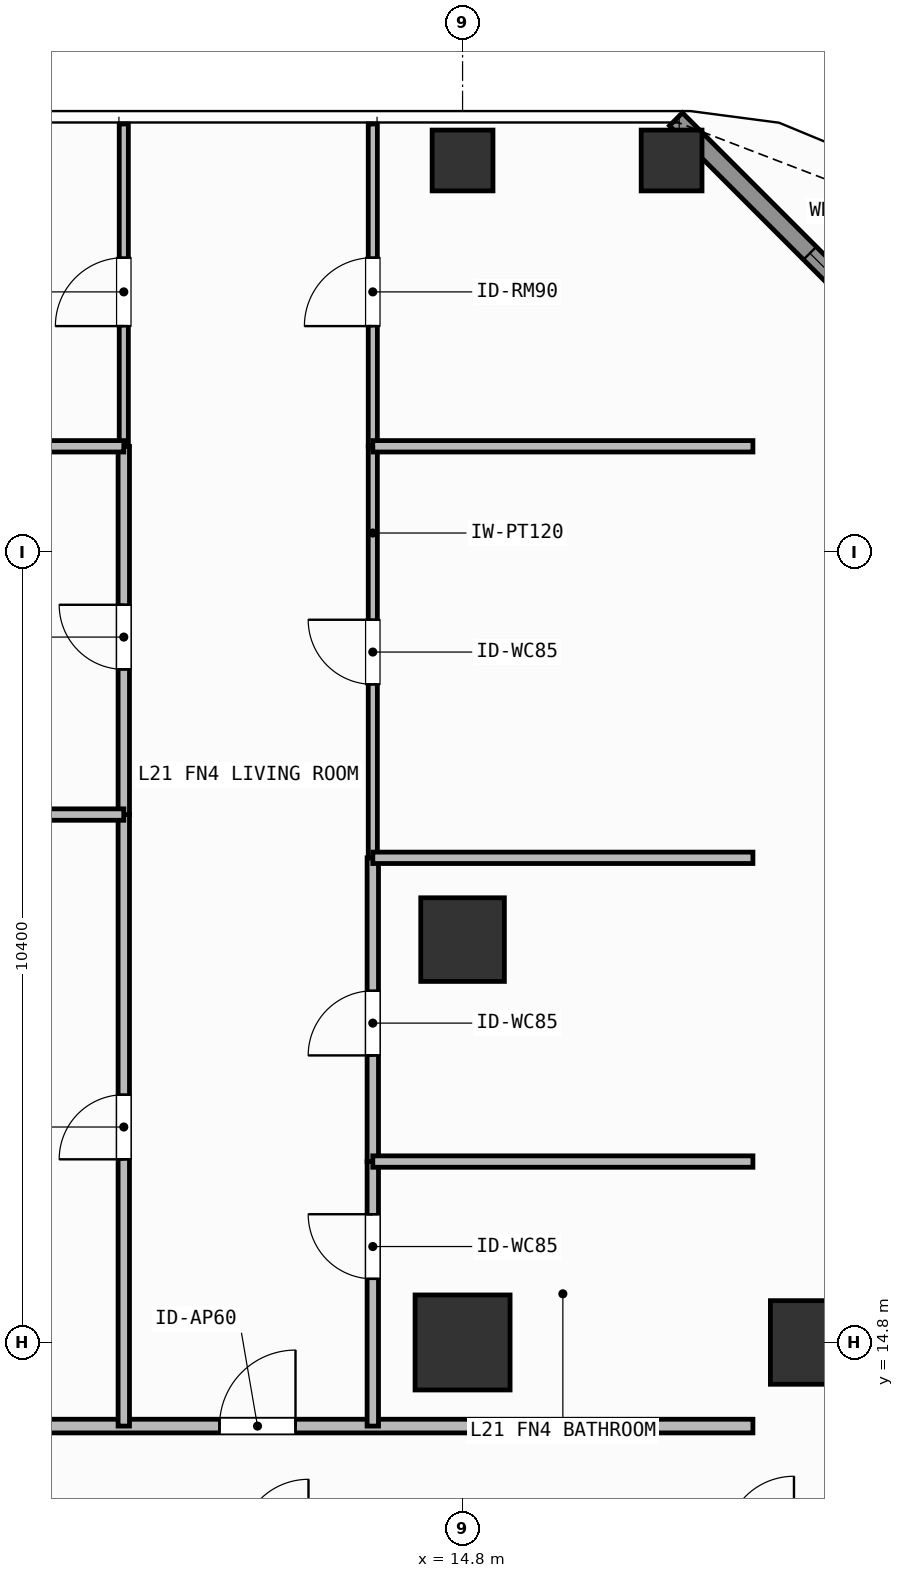
"""IFC4 building model, lengths in metres.
Left out: names, types, materials, properties, quantities, classifications, styles, units other than length and angle.
Written with IfcOpenShell. Run it as: python <this file> out.ifc"""

import sys

from ifc_helpers import new_model, si_unit, direction, frame, frame_2d, origin, origin_2d, place, context, subcontext, project, spatial, rectangle, hollow_rectangle, extrude, element, fill, save


model = new_model("IFC4")
c1 = context("Model", 3, precision=1e-05, world=origin(), true_north=direction((0.0, 1.0)))
c2 = subcontext(c1, "Body", "Model", "MODEL_VIEW")
j1 = project(units=[si_unit("LENGTHUNIT", "METRE"), si_unit("PLANEANGLEUNIT", "RADIAN")], contexts=[c1])
p1 = place(None, origin())
s1 = spatial("IfcSite", under=j1, at=p1, CompositionType="ELEMENT")
p2 = place(p1, origin())
s2 = spatial("IfcBuilding", under=s1, at=p2, CompositionType="ELEMENT")
p3 = place(p2, frame((0.0, 0.0, 85.2)))
s3 = spatial("IfcBuildingStorey", under=s2, at=p3, CompositionType="ELEMENT", Elevation=85.2)
p4 = place(p3, frame((14.8, 14.8, 0.0), z_axis=(0.0, 0.0, 1.0), x_axis=(1.0, 0.0, 0.0)))
e1 = element("IfcColumn", 1, at=p4, inside=s3, PredefinedType="COLUMN", context=c2, shape_type="SweptSolid", body=[
    extrude(rectangle(XDim=1.25, YDim=1.25, at=origin_2d()), origin(), (0.0, 0.0, 1.0), 3.9),
])
for number, where, z_axis, x_axis in (
    (2, (19.4, 14.8, 0.0), (0.0, 0.0, 1.0), (1.0, 0.0, 0.0)),
    (3, (14.8, 20.1, 0.0), (0.0, 0.0, 1.0), (1.0, 0.0, 0.0)),
):
    element("IfcColumn", number, at=place(p3, frame(where, z_axis=z_axis, x_axis=x_axis)), inside=s3, PredefinedType="COLUMN", context=c2, shape_type="SweptSolid", body=[
        extrude(rectangle(XDim=1.1, YDim=1.1, at=origin_2d()), origin(), (0.0, 0.0, 1.0), 3.9),
    ])
for number, where, z_axis, x_axis in (
    (4, (17.55, 30.35, 0.0), (0.0, 0.0, 1.0), (1.0, 0.0, 0.0)),
    (5, (14.8, 30.35, 0.0), (0.0, 0.0, 1.0), (1.0, 0.0, 0.0)),
):
    element("IfcColumn", number, at=place(p3, frame(where, z_axis=z_axis, x_axis=x_axis)), inside=s3, PredefinedType="COLUMN", context=c2, shape_type="SweptSolid", body=[
        extrude(hollow_rectangle(XDim=0.8, YDim=0.8, WallThickness=0.036, at=origin_2d()), origin(), (0.0, 0.0, 1.0), 3.9),
    ])
p5 = place(p3, frame((17.608, 30.892, 0.0), z_axis=(0.0, 0.0, 1.0), x_axis=(0.707106781187, -0.707106781187, 0.0)))
e6 = element("IfcWall", 6, at=p5, inside=s3, PredefinedType="SOLIDWALL", context=c2, shape_type="SweptSolid", body=[
    extrude(rectangle(XDim=6.484, YDim=0.24, at=frame_2d((3.242, 0.0))), origin(), (0.0, 0.0, 1.0), 3.68),
])
p6 = place(p5, frame((2.492, 0.0, 0.8)))
e7 = element("IfcOpeningElement", 7, at=p6, cuts=e6, PredefinedType="OPENING", context=c2, shape_type="SweptSolid", body=[
    extrude(rectangle(XDim=1.5, YDim=1.85, at=frame_2d((0.75, 0.925))), frame((0.0, 0.13, 0.0), z_axis=(0.0, -1.0, 0.0), x_axis=(1.0, 0.0, 0.0)), (0.0, 0.0, 1.0), 0.26),
])
p7 = place(p3, frame((6.117, 13.7, 0.0), z_axis=(0.0, 0.0, 1.0), x_axis=(1.0, 0.0, 0.0)))
e8 = element("IfcWall", 8, at=p7, inside=s3, PredefinedType="PARTITIONING", context=c2, shape_type="SweptSolid", body=[
    extrude(rectangle(XDim=12.503, YDim=0.18, at=frame_2d((6.251, 0.0))), origin(), (0.0, 0.0, 1.0), 3.68),
])
p8 = place(p7, frame((5.485, 0.0, 0.0)))
e9 = element("IfcOpeningElement", 9, at=p8, cuts=e8, PredefinedType="OPENING", context=c2, shape_type="SweptSolid", body=[
    extrude(rectangle(XDim=1.0, YDim=2.2, at=frame_2d((0.5, 1.1))), frame((0.0, 0.1, 0.0), z_axis=(0.0, -1.0, 0.0), x_axis=(1.0, 0.0, 0.0)), (0.0, 0.0, 1.0), 0.2),
])
p9 = place(p3, frame((10.343, 13.7, 0.0), z_axis=(0.0, 0.0, 1.0), x_axis=(0.0, 1.0, 0.0)))
e10 = element("IfcWall", 10, at=p9, inside=s3, PredefinedType="PARTITIONING", context=c2, shape_type="SweptSolid", body=[
    extrude(rectangle(XDim=8.045, YDim=0.15, at=frame_2d((4.022, 0.0))), origin(), (0.0, 0.0, 1.0), 3.68),
])
p10 = place(p9, frame((3.51, 0.0, 0.0)))
e11 = element("IfcOpeningElement", 11, at=p10, cuts=e10, PredefinedType="OPENING", context=c2, shape_type="SweptSolid", body=[
    extrude(rectangle(XDim=0.85, YDim=2.1, at=frame_2d((0.425, 1.05))), frame((0.0, 0.085, 0.0), z_axis=(0.0, -1.0, 0.0), x_axis=(1.0, 0.0, 0.0)), (0.0, 0.0, 1.0), 0.17),
])
p11 = place(p3, frame((10.343, 21.745, 0.0), z_axis=(0.0, 0.0, 1.0), x_axis=(0.0, 1.0, 0.0)))
e12 = element("IfcWall", 12, at=p11, inside=s3, PredefinedType="PARTITIONING", context=c2, shape_type="SweptSolid", body=[
    extrude(rectangle(XDim=4.845, YDim=0.15, at=frame_2d((2.422, 0.0))), origin(), (0.0, 0.0, 1.0), 3.68),
])
p12 = place(p11, frame((1.91, 0.0, 0.0)))
e13 = element("IfcOpeningElement", 13, at=p12, cuts=e12, PredefinedType="OPENING", context=c2, shape_type="SweptSolid", body=[
    extrude(rectangle(XDim=0.85, YDim=2.1, at=frame_2d((0.425, 1.05))), frame((0.0, 0.085, 0.0), z_axis=(0.0, -1.0, 0.0), x_axis=(1.0, 0.0, 0.0)), (0.0, 0.0, 1.0), 0.17),
])
p13 = place(p3, frame((10.343, 26.59, 0.0), z_axis=(0.0, 0.0, 1.0), x_axis=(0.0, 1.0, 0.0)))
e14 = element("IfcWall", 14, at=p13, inside=s3, PredefinedType="PARTITIONING", context=c2, shape_type="SweptSolid", body=[
    extrude(rectangle(XDim=4.24, YDim=0.12, at=frame_2d((2.12, 0.0))), origin(), (0.0, 0.0, 1.0), 3.68),
])
p14 = place(p13, frame((1.581, 0.0, 0.0)))
e15 = element("IfcOpeningElement", 15, at=p14, cuts=e14, PredefinedType="OPENING", context=c2, shape_type="SweptSolid", body=[
    extrude(rectangle(XDim=0.9, YDim=2.1, at=frame_2d((0.45, 1.05))), frame((0.0, 0.07, 0.0), z_axis=(0.0, -1.0, 0.0), x_axis=(1.0, 0.0, 0.0)), (0.0, 0.0, 1.0), 0.14),
])
p15 = place(p3, frame((13.619, 13.7, 0.0), z_axis=(0.0, 0.0, 1.0), x_axis=(0.0, 1.0, 0.0)))
e16 = element("IfcWall", 16, at=p15, inside=s3, PredefinedType="PARTITIONING", context=c2, shape_type="SweptSolid", body=[
    extrude(rectangle(XDim=3.48, YDim=0.15, at=frame_2d((1.74, 0.0))), origin(), (0.0, 0.0, 1.0), 3.68),
])
p16 = place(p15, frame((1.937, 0.0, 0.0)))
e17 = element("IfcOpeningElement", 17, at=p16, cuts=e16, PredefinedType="OPENING", context=c2, shape_type="SweptSolid", body=[
    extrude(rectangle(XDim=0.85, YDim=2.1, at=frame_2d((0.425, 1.05))), frame((0.0, 0.085, 0.0), z_axis=(0.0, -1.0, 0.0), x_axis=(1.0, 0.0, 0.0)), (0.0, 0.0, 1.0), 0.17),
])
p17 = place(p3, frame((13.619, 17.18, 0.0), z_axis=(0.0, 0.0, 1.0), x_axis=(0.0, 1.0, 0.0)))
e18 = element("IfcWall", 18, at=p17, inside=s3, PredefinedType="PARTITIONING", context=c2, shape_type="SweptSolid", body=[
    extrude(rectangle(XDim=3.996, YDim=0.15, at=frame_2d((1.998, 0.0))), origin(), (0.0, 0.0, 1.0), 3.68),
])
p18 = place(p17, frame((1.396, 0.0, 0.0)))
e19 = element("IfcOpeningElement", 19, at=p18, cuts=e18, PredefinedType="OPENING", context=c2, shape_type="SweptSolid", body=[
    extrude(rectangle(XDim=0.85, YDim=2.1, at=frame_2d((0.425, 1.05))), frame((0.0, 0.085, 0.0), z_axis=(0.0, -1.0, 0.0), x_axis=(1.0, 0.0, 0.0)), (0.0, 0.0, 1.0), 0.17),
])
p19 = place(p3, frame((13.619, 21.176, 0.0), z_axis=(0.0, 0.0, 1.0), x_axis=(0.0, 1.0, 0.0)))
e20 = element("IfcWall", 20, at=p19, inside=s3, PredefinedType="PARTITIONING", context=c2, shape_type="SweptSolid", body=[
    extrude(rectangle(XDim=5.414, YDim=0.12, at=frame_2d((2.707, 0.0))), origin(), (0.0, 0.0, 1.0), 3.68),
])
p20 = place(p19, frame((2.282, 0.0, 0.0)))
e21 = element("IfcOpeningElement", 21, at=p20, cuts=e20, PredefinedType="OPENING", context=c2, shape_type="SweptSolid", body=[
    extrude(rectangle(XDim=0.85, YDim=2.1, at=frame_2d((0.425, 1.05))), frame((0.0, 0.07, 0.0), z_axis=(0.0, -1.0, 0.0), x_axis=(1.0, 0.0, 0.0)), (0.0, 0.0, 1.0), 0.14),
])
p21 = place(p3, frame((13.619, 26.59, 0.0), z_axis=(0.0, 0.0, 1.0), x_axis=(0.0, 1.0, 0.0)))
e22 = element("IfcWall", 22, at=p21, inside=s3, PredefinedType="PARTITIONING", context=c2, shape_type="SweptSolid", body=[
    extrude(rectangle(XDim=4.24, YDim=0.12, at=frame_2d((2.12, 0.0))), origin(), (0.0, 0.0, 1.0), 3.68),
])
p22 = place(p21, frame((1.581, 0.0, 0.0)))
e23 = element("IfcOpeningElement", 23, at=p22, cuts=e22, PredefinedType="OPENING", context=c2, shape_type="SweptSolid", body=[
    extrude(rectangle(XDim=0.9, YDim=2.1, at=frame_2d((0.45, 1.05))), frame((0.0, 0.07, 0.0), z_axis=(0.0, -1.0, 0.0), x_axis=(1.0, 0.0, 0.0)), (0.0, 0.0, 1.0), 0.14),
])
for number, where, z_axis, x_axis in (
    (24, (6.117, 21.745, 0.0), (0.0, 0.0, 1.0), (1.0, 0.0, 0.0)),
    (25, (6.117, 26.59, 0.0), (0.0, 0.0, 1.0), (1.0, 0.0, 0.0)),
):
    element("IfcWall", number, at=place(p3, frame(where, z_axis=z_axis, x_axis=x_axis)), inside=s3, PredefinedType="PARTITIONING", context=c2, shape_type="SweptSolid", body=[
        extrude(rectangle(XDim=4.226, YDim=0.15, at=frame_2d((2.113, 0.0))), origin(), (0.0, 0.0, 1.0), 3.68),
    ])
for number, where, z_axis, x_axis in (
    (26, (13.619, 17.18, 0.0), (0.0, 0.0, 1.0), (1.0, 0.0, 0.0)),
    (27, (13.619, 21.176, 0.0), (0.0, 0.0, 1.0), (1.0, 0.0, 0.0)),
    (28, (13.619, 26.59, 0.0), (0.0, 0.0, 1.0), (1.0, 0.0, 0.0)),
):
    element("IfcWall", number, at=place(p3, frame(where, z_axis=z_axis, x_axis=x_axis)), inside=s3, PredefinedType="PARTITIONING", context=c2, shape_type="SweptSolid", body=[
        extrude(rectangle(XDim=5.001, YDim=0.15, at=frame_2d((2.5, 0.0))), origin(), (0.0, 0.0, 1.0), 3.68),
    ])
p23 = place(p6, origin())
e29 = element("IfcWindow", 29, at=p23, inside=s3, PartitioningType="SINGLE_PANEL", PredefinedType="WINDOW", context=c2, shape_type="SweptSolid", body=[
    extrude(rectangle(XDim=1.5, YDim=1.85, at=frame_2d((0.75, 0.925))), frame((0.0, 0.03, 0.0), z_axis=(0.0, -1.0, 0.0), x_axis=(1.0, 0.0, 0.0)), (0.0, 0.0, 1.0), 0.06),
])
fill(e7, e29)
p24 = place(p8, origin())
e30 = element("IfcDoor", 30, at=p24, inside=s3, OperationType="SINGLE_SWING_RIGHT", PredefinedType="DOOR", context=c2, shape_type="SweptSolid", body=[
    extrude(rectangle(XDim=1.0, YDim=2.2, at=frame_2d((0.5, 1.1))), frame((0.0, 0.025, 0.0), z_axis=(0.0, -1.0, 0.0), x_axis=(1.0, 0.0, 0.0)), (0.0, 0.0, 1.0), 0.05),
])
fill(e9, e30)
p25 = place(p10, origin())
e31 = element("IfcDoor", 31, at=p25, inside=s3, OperationType="SINGLE_SWING_LEFT", PredefinedType="DOOR", context=c2, shape_type="SweptSolid", body=[
    extrude(rectangle(XDim=0.85, YDim=2.1, at=frame_2d((0.425, 1.05))), frame((0.0, 0.025, 0.0), z_axis=(0.0, -1.0, 0.0), x_axis=(1.0, 0.0, 0.0)), (0.0, 0.0, 1.0), 0.05),
])
fill(e11, e31)
p26 = place(p12, origin())
e32 = element("IfcDoor", 32, at=p26, inside=s3, OperationType="SINGLE_SWING_RIGHT", PredefinedType="DOOR", context=c2, shape_type="SweptSolid", body=[
    extrude(rectangle(XDim=0.85, YDim=2.1, at=frame_2d((0.425, 1.05))), frame((0.0, 0.025, 0.0), z_axis=(0.0, -1.0, 0.0), x_axis=(1.0, 0.0, 0.0)), (0.0, 0.0, 1.0), 0.05),
])
fill(e13, e32)
p27 = place(p14, origin())
e33 = element("IfcDoor", 33, at=p27, inside=s3, OperationType="SINGLE_SWING_LEFT", PredefinedType="DOOR", context=c2, shape_type="SweptSolid", body=[
    extrude(rectangle(XDim=0.9, YDim=2.1, at=frame_2d((0.45, 1.05))), frame((0.0, 0.025, 0.0), z_axis=(0.0, -1.0, 0.0), x_axis=(1.0, 0.0, 0.0)), (0.0, 0.0, 1.0), 0.05),
])
fill(e15, e33)
p28 = place(p16, origin())
e34 = element("IfcDoor", 34, at=p28, inside=s3, OperationType="SINGLE_SWING_RIGHT", PredefinedType="DOOR", context=c2, shape_type="SweptSolid", body=[
    extrude(rectangle(XDim=0.85, YDim=2.1, at=frame_2d((0.425, 1.05))), frame((0.0, 0.025, 0.0), z_axis=(0.0, -1.0, 0.0), x_axis=(1.0, 0.0, 0.0)), (0.0, 0.0, 1.0), 0.05),
])
fill(e17, e34)
p29 = place(p18, origin())
e35 = element("IfcDoor", 35, at=p29, inside=s3, OperationType="SINGLE_SWING_LEFT", PredefinedType="DOOR", context=c2, shape_type="SweptSolid", body=[
    extrude(rectangle(XDim=0.85, YDim=2.1, at=frame_2d((0.425, 1.05))), frame((0.0, 0.025, 0.0), z_axis=(0.0, -1.0, 0.0), x_axis=(1.0, 0.0, 0.0)), (0.0, 0.0, 1.0), 0.05),
])
fill(e19, e35)
p30 = place(p20, origin())
e36 = element("IfcDoor", 36, at=p30, inside=s3, OperationType="SINGLE_SWING_RIGHT", PredefinedType="DOOR", context=c2, shape_type="SweptSolid", body=[
    extrude(rectangle(XDim=0.85, YDim=2.1, at=frame_2d((0.425, 1.05))), frame((0.0, 0.025, 0.0), z_axis=(0.0, -1.0, 0.0), x_axis=(1.0, 0.0, 0.0)), (0.0, 0.0, 1.0), 0.05),
])
fill(e21, e36)
p31 = place(p22, origin())
e37 = element("IfcDoor", 37, at=p31, inside=s3, OperationType="SINGLE_SWING_LEFT", PredefinedType="DOOR", context=c2, shape_type="SweptSolid", body=[
    extrude(rectangle(XDim=0.9, YDim=2.1, at=frame_2d((0.45, 1.05))), frame((0.0, 0.025, 0.0), z_axis=(0.0, -1.0, 0.0), x_axis=(1.0, 0.0, 0.0)), (0.0, 0.0, 1.0), 0.05),
])
fill(e23, e37)
save(model, sys.argv[1])
